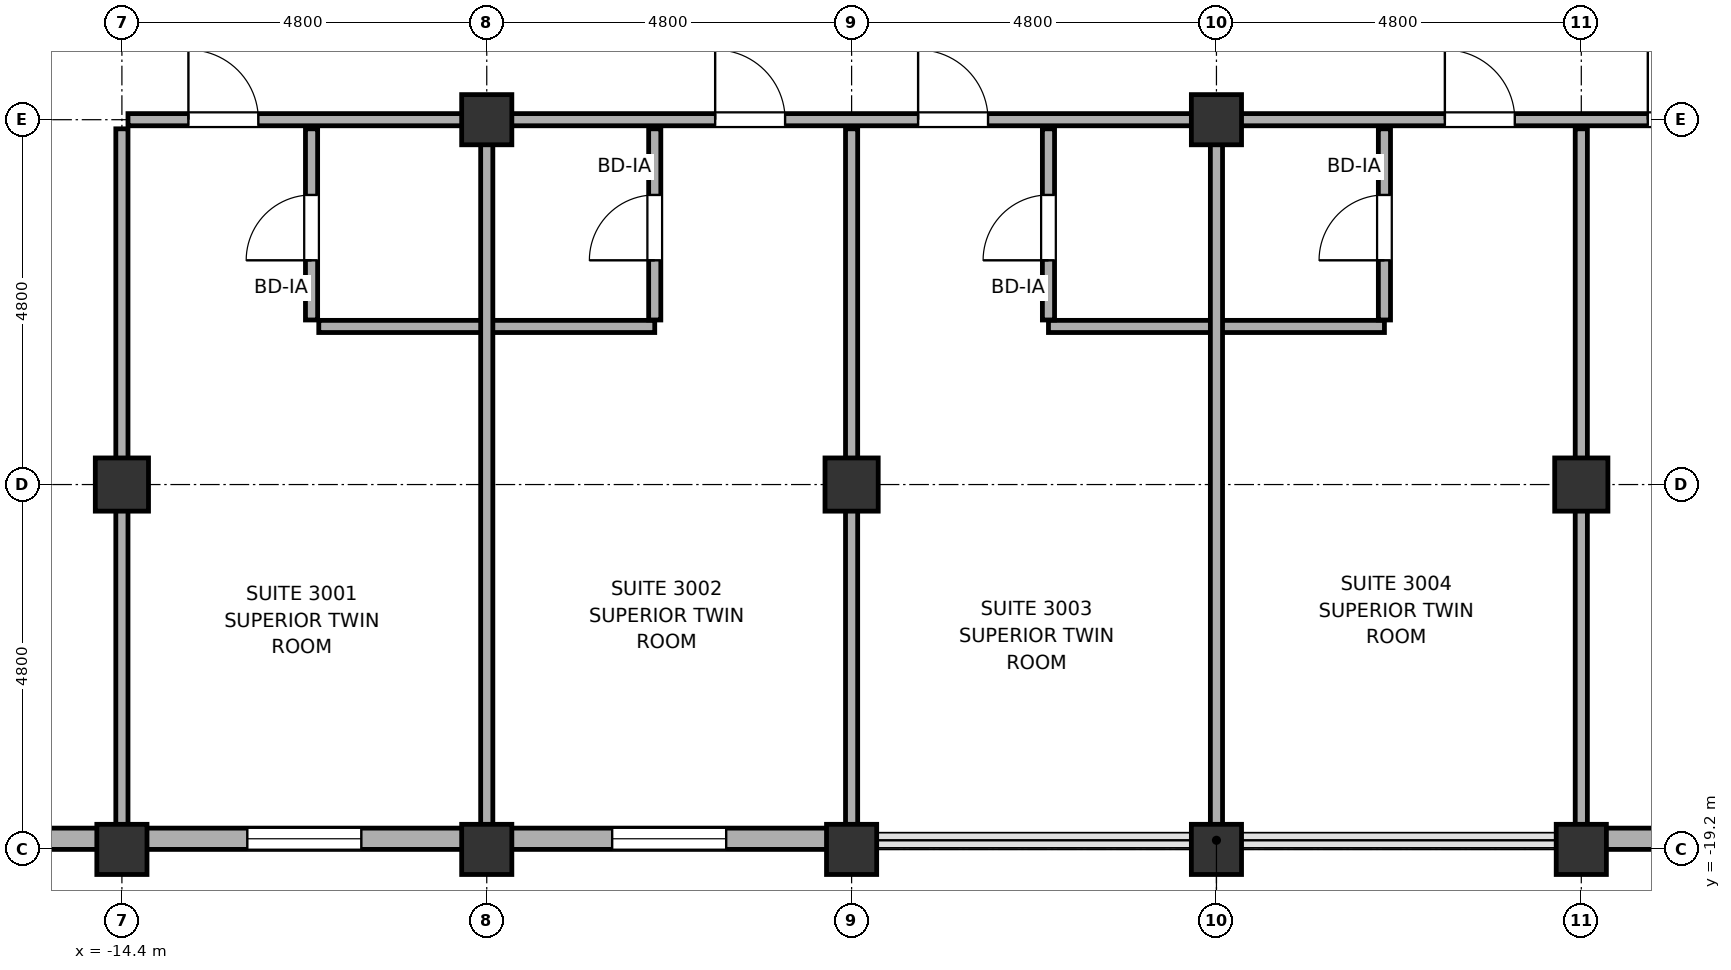
"""IFC4 building model, lengths in metres.
Left out: names, types, materials, properties, quantities, classifications, styles, units other than length and angle.
Written with IfcOpenShell. Run it as: python <this file> out.ifc"""

import sys

from ifc_helpers import new_model, si_unit, direction, frame, frame_2d, origin, origin_2d, place, context, subcontext, project, spatial, rectangle, hollow_rectangle, hollow_circle, extrude, element, fill, save


model = new_model("IFC4")
c1 = context("Model", 3, precision=1e-05, world=origin(), true_north=direction((0.0, 1.0)))
c2 = subcontext(c1, "Body", "Model", "MODEL_VIEW")
j1 = project(units=[si_unit("LENGTHUNIT", "METRE"), si_unit("PLANEANGLEUNIT", "RADIAN")], contexts=[c1])
p1 = place(None, origin())
s1 = spatial("IfcSite", under=j1, at=p1, CompositionType="ELEMENT")
p2 = place(p1, origin())
s2 = spatial("IfcBuilding", under=s1, at=p2, CompositionType="ELEMENT")
p3 = place(p2, frame((0.0, 0.0, 124.8)))
s3 = spatial("IfcBuildingStorey", under=s2, at=p3, CompositionType="ELEMENT", Elevation=124.8)
p4 = place(p3, frame((-14.4, -19.2, 0.0), z_axis=(0.0, 0.0, 1.0), x_axis=(1.0, 0.0, 0.0)))
e1 = element("IfcColumn", 1, at=p4, inside=s3, PredefinedType="COLUMN", context=c2, shape_type="SweptSolid", body=[
    extrude(hollow_circle(Radius=0.33, WallThickness=0.028, at=origin_2d()), origin(), (0.0, 0.0, 1.0), 3.7),
])
p5 = place(p3, frame((-14.4, -14.4, 0.0), z_axis=(0.0, 0.0, 1.0), x_axis=(1.0, 0.0, 0.0)))
e2 = element("IfcColumn", 2, at=p5, inside=s3, PredefinedType="COLUMN", context=c2, shape_type="SweptSolid", body=[
    extrude(hollow_rectangle(XDim=0.7, YDim=0.7, WallThickness=0.032, at=origin_2d()), origin(), (0.0, 0.0, 1.0), 3.7),
])
for number, where, z_axis, x_axis in (
    (3, (-9.6, -19.2, 0.0), (0.0, 0.0, 1.0), (1.0, 0.0, 0.0)),
    (4, (-9.6, -9.6, 0.0), (0.0, 0.0, 1.0), (1.0, 0.0, 0.0)),
    (5, (-4.8, -19.2, 0.0), (0.0, 0.0, 1.0), (1.0, 0.0, 0.0)),
):
    element("IfcColumn", number, at=place(p3, frame(where, z_axis=z_axis, x_axis=x_axis)), inside=s3, PredefinedType="COLUMN", context=c2, shape_type="SweptSolid", body=[
        extrude(hollow_circle(Radius=0.33, WallThickness=0.028, at=origin_2d()), origin(), (0.0, 0.0, 1.0), 3.7),
    ])
p6 = place(p3, frame((-4.8, -14.4, 0.0), z_axis=(0.0, 0.0, 1.0), x_axis=(1.0, 0.0, 0.0)))
e6 = element("IfcColumn", 6, at=p6, inside=s3, PredefinedType="COLUMN", context=c2, shape_type="SweptSolid", body=[
    extrude(hollow_rectangle(XDim=0.7, YDim=0.7, WallThickness=0.032, at=origin_2d()), origin(), (0.0, 0.0, 1.0), 3.7),
])
for number, where, z_axis, x_axis in (
    (7, (0.0, -19.2, 0.0), (0.0, 0.0, 1.0), (1.0, 0.0, 0.0)),
    (8, (0.0, -9.6, 0.0), (0.0, 0.0, 1.0), (1.0, 0.0, 0.0)),
    (9, (4.8, -19.2, 0.0), (0.0, 0.0, 1.0), (1.0, 0.0, 0.0)),
):
    element("IfcColumn", number, at=place(p3, frame(where, z_axis=z_axis, x_axis=x_axis)), inside=s3, PredefinedType="COLUMN", context=c2, shape_type="SweptSolid", body=[
        extrude(hollow_circle(Radius=0.33, WallThickness=0.028, at=origin_2d()), origin(), (0.0, 0.0, 1.0), 3.7),
    ])
p7 = place(p3, frame((4.8, -14.4, 0.0), z_axis=(0.0, 0.0, 1.0), x_axis=(1.0, 0.0, 0.0)))
e10 = element("IfcColumn", 10, at=p7, inside=s3, PredefinedType="COLUMN", context=c2, shape_type="SweptSolid", body=[
    extrude(hollow_rectangle(XDim=0.7, YDim=0.7, WallThickness=0.032, at=origin_2d()), origin(), (0.0, 0.0, 1.0), 3.7),
])
p8 = place(p3, frame((-30.0, -19.06, 0.0), z_axis=(0.0, 0.0, 1.0), x_axis=(1.0, 0.0, 0.0)))
e11 = element("IfcWall", 11, at=p8, inside=s3, PredefinedType="SOLIDWALL", context=c2, shape_type="SweptSolid", body=[
    extrude(rectangle(XDim=25.25, YDim=0.28, at=frame_2d((12.625, 0.0))), origin(), (0.0, 0.0, 1.0), 2.12),
])
p9 = place(p8, frame((7.65, 0.0, 0.75)))
e12 = element("IfcOpeningElement", 12, at=p9, cuts=e11, PredefinedType="OPENING", context=c2, shape_type="SweptSolid", body=[
    extrude(rectangle(XDim=1.5, YDim=1.15, at=frame_2d((0.75, 0.575))), frame((0.0, 0.155, 0.0), z_axis=(0.0, -1.0, 0.0), x_axis=(1.0, 0.0, 0.0)), (0.0, 0.0, 1.0), 0.31),
])
p10 = place(p8, frame((17.25, 0.0, 0.75)))
e13 = element("IfcOpeningElement", 13, at=p10, cuts=e11, PredefinedType="OPENING", context=c2, shape_type="SweptSolid", body=[
    extrude(rectangle(XDim=1.5, YDim=1.15, at=frame_2d((0.75, 0.575))), frame((0.0, 0.155, 0.0), z_axis=(0.0, -1.0, 0.0), x_axis=(1.0, 0.0, 0.0)), (0.0, 0.0, 1.0), 0.31),
])
p11 = place(p8, frame((22.05, 0.0, 0.75)))
e14 = element("IfcOpeningElement", 14, at=p11, cuts=e11, PredefinedType="OPENING", context=c2, shape_type="SweptSolid", body=[
    extrude(rectangle(XDim=1.5, YDim=1.15, at=frame_2d((0.75, 0.575))), frame((0.0, 0.155, 0.0), z_axis=(0.0, -1.0, 0.0), x_axis=(1.0, 0.0, 0.0)), (0.0, 0.0, 1.0), 0.31),
])
p12 = place(p3, frame((4.75, -19.06, 0.0), z_axis=(0.0, 0.0, 1.0), x_axis=(1.0, 0.0, 0.0)))
e15 = element("IfcWall", 15, at=p12, inside=s3, PredefinedType="SOLIDWALL", context=c2, shape_type="SweptSolid", body=[
    extrude(rectangle(XDim=20.45, YDim=0.28, at=frame_2d((10.225, 0.0))), origin(), (0.0, 0.0, 1.0), 2.12),
])
p13 = place(p12, frame((11.817, 0.0, 0.75)))
e16 = element("IfcOpeningElement", 16, at=p13, cuts=e15, PredefinedType="OPENING", context=c2, shape_type="SweptSolid", body=[
    extrude(rectangle(XDim=1.5, YDim=1.15, at=frame_2d((0.75, 0.575))), frame((0.0, 0.155, 0.0), z_axis=(0.0, -1.0, 0.0), x_axis=(1.0, 0.0, 0.0)), (0.0, 0.0, 1.0), 0.31),
])
p14 = place(p12, frame((1.7, 0.0, 0.75)))
e17 = element("IfcOpeningElement", 17, at=p14, cuts=e15, PredefinedType="OPENING", context=c2, shape_type="SweptSolid", body=[
    extrude(rectangle(XDim=1.5, YDim=1.15, at=frame_2d((0.75, 0.575))), frame((0.0, 0.155, 0.0), z_axis=(0.0, -1.0, 0.0), x_axis=(1.0, 0.0, 0.0)), (0.0, 0.0, 1.0), 0.31),
])
p15 = place(p12, frame((6.5, 0.0, 0.75)))
e18 = element("IfcOpeningElement", 18, at=p15, cuts=e15, PredefinedType="OPENING", context=c2, shape_type="SweptSolid", body=[
    extrude(rectangle(XDim=1.5, YDim=1.15, at=frame_2d((0.75, 0.575))), frame((0.0, 0.155, 0.0), z_axis=(0.0, -1.0, 0.0), x_axis=(1.0, 0.0, 0.0)), (0.0, 0.0, 1.0), 0.31),
])
p16 = place(p3, frame((-11.81, -12.32, 0.0), z_axis=(0.0, 0.0, 1.0), x_axis=(1.0, 0.0, 0.0)))
e19 = element("IfcWall", 19, at=p16, inside=s3, PredefinedType="PARTITIONING", context=c2, shape_type="SweptSolid", body=[
    extrude(rectangle(XDim=4.42, YDim=0.16, at=frame_2d((2.21, 0.0))), origin(), (0.0, 0.0, 1.0), 3.12),
])
p17 = place(p3, frame((-2.21, -12.32, 0.0), z_axis=(0.0, 0.0, 1.0), x_axis=(1.0, 0.0, 0.0)))
e20 = element("IfcWall", 20, at=p17, inside=s3, PredefinedType="PARTITIONING", context=c2, shape_type="SweptSolid", body=[
    extrude(rectangle(XDim=4.42, YDim=0.16, at=frame_2d((2.21, 0.0))), origin(), (0.0, 0.0, 1.0), 3.12),
])
p18 = place(p3, frame((-14.32, -9.6, 0.0), z_axis=(0.0, 0.0, 1.0), x_axis=(1.0, 0.0, 0.0)))
e21 = element("IfcWall", 21, at=p18, inside=s3, PredefinedType="PARTITIONING", context=c2, shape_type="SweptSolid", body=[
    extrude(rectangle(XDim=28.64, YDim=0.16, at=frame_2d((14.32, 0.0))), origin(), (0.0, 0.0, 1.0), 2.12),
])
p19 = place(p18, frame((0.795, 0.0, 0.0)))
e22 = element("IfcOpeningElement", 22, at=p19, cuts=e21, PredefinedType="OPENING", context=c2, shape_type="SweptSolid", body=[
    extrude(rectangle(XDim=0.92, YDim=2.02, at=frame_2d((0.46, 1.01))), frame((0.0, 0.095, 0.0), z_axis=(0.0, -1.0, 0.0), x_axis=(1.0, 0.0, 0.0)), (0.0, 0.0, 1.0), 0.19),
])
p20 = place(p18, frame((7.725, 0.0, 0.0)))
e23 = element("IfcOpeningElement", 23, at=p20, cuts=e21, PredefinedType="OPENING", context=c2, shape_type="SweptSolid", body=[
    extrude(rectangle(XDim=0.92, YDim=2.02, at=frame_2d((0.46, 1.01))), frame((0.0, 0.095, 0.0), z_axis=(0.0, -1.0, 0.0), x_axis=(1.0, 0.0, 0.0)), (0.0, 0.0, 1.0), 0.19),
])
p21 = place(p18, frame((10.395, 0.0, 0.0)))
e24 = element("IfcOpeningElement", 24, at=p21, cuts=e21, PredefinedType="OPENING", context=c2, shape_type="SweptSolid", body=[
    extrude(rectangle(XDim=0.92, YDim=2.02, at=frame_2d((0.46, 1.01))), frame((0.0, 0.095, 0.0), z_axis=(0.0, -1.0, 0.0), x_axis=(1.0, 0.0, 0.0)), (0.0, 0.0, 1.0), 0.19),
])
p22 = place(p18, frame((17.325, 0.0, 0.0)))
e25 = element("IfcOpeningElement", 25, at=p22, cuts=e21, PredefinedType="OPENING", context=c2, shape_type="SweptSolid", body=[
    extrude(rectangle(XDim=0.92, YDim=2.02, at=frame_2d((0.46, 1.01))), frame((0.0, 0.095, 0.0), z_axis=(0.0, -1.0, 0.0), x_axis=(1.0, 0.0, 0.0)), (0.0, 0.0, 1.0), 0.19),
])
p23 = place(p18, frame((19.995, 0.0, 0.0)))
e26 = element("IfcOpeningElement", 26, at=p23, cuts=e21, PredefinedType="OPENING", context=c2, shape_type="SweptSolid", body=[
    extrude(rectangle(XDim=0.92, YDim=2.02, at=frame_2d((0.46, 1.01))), frame((0.0, 0.095, 0.0), z_axis=(0.0, -1.0, 0.0), x_axis=(1.0, 0.0, 0.0)), (0.0, 0.0, 1.0), 0.19),
])
p24 = place(p18, frame((26.925, 0.0, 0.0)))
e27 = element("IfcOpeningElement", 27, at=p24, cuts=e21, PredefinedType="OPENING", context=c2, shape_type="SweptSolid", body=[
    extrude(rectangle(XDim=0.92, YDim=2.02, at=frame_2d((0.46, 1.01))), frame((0.0, 0.095, 0.0), z_axis=(0.0, -1.0, 0.0), x_axis=(1.0, 0.0, 0.0)), (0.0, 0.0, 1.0), 0.19),
])
p25 = place(p3, frame((-14.4, -18.91, 0.0), z_axis=(0.0, 0.0, 1.0), x_axis=(0.0, 1.0, 0.0)))
e28 = element("IfcWall", 28, at=p25, inside=s3, PredefinedType="PARTITIONING", context=c2, shape_type="SweptSolid", body=[
    extrude(rectangle(XDim=9.19, YDim=0.16, at=frame_2d((4.595, 0.0))), origin(), (0.0, 0.0, 1.0), 2.12),
])
p26 = place(p3, frame((-11.905, -12.235, 0.0), z_axis=(0.0, 0.0, 1.0), x_axis=(0.0, 1.0, 0.0)))
e29 = element("IfcWall", 29, at=p26, inside=s3, PredefinedType="PARTITIONING", context=c2, shape_type="SweptSolid", body=[
    extrude(rectangle(XDim=2.515, YDim=0.16, at=frame_2d((1.258, 0.0))), origin(), (0.0, 0.0, 1.0), 2.12),
])
p27 = place(p26, frame((0.785, 0.0, 0.0)))
e30 = element("IfcOpeningElement", 30, at=p27, cuts=e29, PredefinedType="OPENING", context=c2, shape_type="SweptSolid", body=[
    extrude(rectangle(XDim=0.86, YDim=2.02, at=frame_2d((0.43, 1.01))), frame((0.0, 0.095, 0.0), z_axis=(0.0, -1.0, 0.0), x_axis=(1.0, 0.0, 0.0)), (0.0, 0.0, 1.0), 0.19),
])
p28 = place(p3, frame((-9.6, -18.91, 0.0), z_axis=(0.0, 0.0, 1.0), x_axis=(0.0, 1.0, 0.0)))
e31 = element("IfcWall", 31, at=p28, inside=s3, PredefinedType="PARTITIONING", context=c2, shape_type="SweptSolid", body=[
    extrude(rectangle(XDim=9.19, YDim=0.16, at=frame_2d((4.595, 0.0))), origin(), (0.0, 0.0, 1.0), 2.12),
])
p29 = place(p3, frame((-7.39, -12.235, 0.0), z_axis=(0.0, 0.0, 1.0), x_axis=(0.0, 1.0, 0.0)))
e32 = element("IfcWall", 32, at=p29, inside=s3, PredefinedType="PARTITIONING", context=c2, shape_type="SweptSolid", body=[
    extrude(rectangle(XDim=2.515, YDim=0.16, at=frame_2d((1.258, 0.0))), origin(), (0.0, 0.0, 1.0), 2.12),
])
p30 = place(p29, frame((0.785, 0.0, 0.0)))
e33 = element("IfcOpeningElement", 33, at=p30, cuts=e32, PredefinedType="OPENING", context=c2, shape_type="SweptSolid", body=[
    extrude(rectangle(XDim=0.86, YDim=2.02, at=frame_2d((0.43, 1.01))), frame((0.0, 0.095, 0.0), z_axis=(0.0, -1.0, 0.0), x_axis=(1.0, 0.0, 0.0)), (0.0, 0.0, 1.0), 0.19),
])
p31 = place(p3, frame((-4.8, -18.91, 0.0), z_axis=(0.0, 0.0, 1.0), x_axis=(0.0, 1.0, 0.0)))
e34 = element("IfcWall", 34, at=p31, inside=s3, PredefinedType="PARTITIONING", context=c2, shape_type="SweptSolid", body=[
    extrude(rectangle(XDim=9.19, YDim=0.16, at=frame_2d((4.595, 0.0))), origin(), (0.0, 0.0, 1.0), 2.12),
])
p32 = place(p3, frame((-2.21, -12.235, 0.0), z_axis=(0.0, 0.0, 1.0), x_axis=(0.0, 1.0, 0.0)))
e35 = element("IfcWall", 35, at=p32, inside=s3, PredefinedType="PARTITIONING", context=c2, shape_type="SweptSolid", body=[
    extrude(rectangle(XDim=2.515, YDim=0.16, at=frame_2d((1.258, 0.0))), origin(), (0.0, 0.0, 1.0), 2.12),
])
p33 = place(p32, frame((0.785, 0.0, 0.0)))
e36 = element("IfcOpeningElement", 36, at=p33, cuts=e35, PredefinedType="OPENING", context=c2, shape_type="SweptSolid", body=[
    extrude(rectangle(XDim=0.86, YDim=2.02, at=frame_2d((0.43, 1.01))), frame((0.0, 0.095, 0.0), z_axis=(0.0, -1.0, 0.0), x_axis=(1.0, 0.0, 0.0)), (0.0, 0.0, 1.0), 0.19),
])
p34 = place(p3, frame((0.0, -18.995, 0.0), z_axis=(0.0, 0.0, 1.0), x_axis=(0.0, 1.0, 0.0)))
e37 = element("IfcWall", 37, at=p34, inside=s3, PredefinedType="PARTITIONING", context=c2, shape_type="SweptSolid", body=[
    extrude(rectangle(XDim=9.275, YDim=0.16, at=frame_2d((4.638, 0.0))), origin(), (0.0, 0.0, 1.0), 2.12),
])
p35 = place(p3, frame((2.21, -12.235, 0.0), z_axis=(0.0, 0.0, 1.0), x_axis=(0.0, 1.0, 0.0)))
e38 = element("IfcWall", 38, at=p35, inside=s3, PredefinedType="PARTITIONING", context=c2, shape_type="SweptSolid", body=[
    extrude(rectangle(XDim=2.515, YDim=0.16, at=frame_2d((1.258, 0.0))), origin(), (0.0, 0.0, 1.0), 2.12),
])
p36 = place(p35, frame((0.785, 0.0, 0.0)))
e39 = element("IfcOpeningElement", 39, at=p36, cuts=e38, PredefinedType="OPENING", context=c2, shape_type="SweptSolid", body=[
    extrude(rectangle(XDim=0.86, YDim=2.02, at=frame_2d((0.43, 1.01))), frame((0.0, 0.095, 0.0), z_axis=(0.0, -1.0, 0.0), x_axis=(1.0, 0.0, 0.0)), (0.0, 0.0, 1.0), 0.19),
])
p37 = place(p3, frame((4.8, -18.91, 0.0), z_axis=(0.0, 0.0, 1.0), x_axis=(0.0, 1.0, 0.0)))
e40 = element("IfcWall", 40, at=p37, inside=s3, PredefinedType="PARTITIONING", context=c2, shape_type="SweptSolid", body=[
    extrude(rectangle(XDim=9.19, YDim=0.16, at=frame_2d((4.595, 0.0))), origin(), (0.0, 0.0, 1.0), 2.12),
])
p38 = place(p10, origin())
e41 = element("IfcWindow", 41, at=p38, inside=s3, PartitioningType="SINGLE_PANEL", PredefinedType="WINDOW", context=c2, shape_type="SweptSolid", body=[
    extrude(rectangle(XDim=1.5, YDim=1.15, at=frame_2d((0.75, 0.575))), frame((0.0, 0.03, 0.0), z_axis=(0.0, -1.0, 0.0), x_axis=(1.0, 0.0, 0.0)), (0.0, 0.0, 1.0), 0.06),
])
fill(e13, e41)
p39 = place(p11, origin())
e42 = element("IfcWindow", 42, at=p39, inside=s3, PartitioningType="SINGLE_PANEL", PredefinedType="WINDOW", context=c2, shape_type="SweptSolid", body=[
    extrude(rectangle(XDim=1.5, YDim=1.15, at=frame_2d((0.75, 0.575))), frame((0.0, 0.03, 0.0), z_axis=(0.0, -1.0, 0.0), x_axis=(1.0, 0.0, 0.0)), (0.0, 0.0, 1.0), 0.06),
])
fill(e14, e42)
p40 = place(p19, origin())
e43 = element("IfcDoor", 43, at=p40, inside=s3, OperationType="SINGLE_SWING_LEFT", PredefinedType="DOOR", context=c2, shape_type="SweptSolid", body=[
    extrude(rectangle(XDim=0.92, YDim=2.02, at=frame_2d((0.46, 1.01))), frame((0.0, 0.025, 0.0), z_axis=(0.0, -1.0, 0.0), x_axis=(1.0, 0.0, 0.0)), (0.0, 0.0, 1.0), 0.05),
])
fill(e22, e43)
p41 = place(p27, origin())
e44 = element("IfcDoor", 44, at=p41, inside=s3, OperationType="SINGLE_SWING_LEFT", PredefinedType="DOOR", context=c2, shape_type="SweptSolid", body=[
    extrude(rectangle(XDim=0.86, YDim=2.02, at=frame_2d((0.43, 1.01))), frame((0.0, 0.025, 0.0), z_axis=(0.0, -1.0, 0.0), x_axis=(1.0, 0.0, 0.0)), (0.0, 0.0, 1.0), 0.05),
])
fill(e30, e44)
p42 = place(p20, origin())
e45 = element("IfcDoor", 45, at=p42, inside=s3, OperationType="SINGLE_SWING_LEFT", PredefinedType="DOOR", context=c2, shape_type="SweptSolid", body=[
    extrude(rectangle(XDim=0.92, YDim=2.02, at=frame_2d((0.46, 1.01))), frame((0.0, 0.025, 0.0), z_axis=(0.0, -1.0, 0.0), x_axis=(1.0, 0.0, 0.0)), (0.0, 0.0, 1.0), 0.05),
])
fill(e23, e45)
p43 = place(p30, origin())
e46 = element("IfcDoor", 46, at=p43, inside=s3, OperationType="SINGLE_SWING_RIGHT", PredefinedType="DOOR", context=c2, shape_type="SweptSolid", body=[
    extrude(rectangle(XDim=0.86, YDim=2.02, at=frame_2d((0.43, 1.01))), frame((0.0, 0.025, 0.0), z_axis=(0.0, -1.0, 0.0), x_axis=(1.0, 0.0, 0.0)), (0.0, 0.0, 1.0), 0.05),
])
fill(e33, e46)
p44 = place(p21, origin())
e47 = element("IfcDoor", 47, at=p44, inside=s3, OperationType="SINGLE_SWING_RIGHT", PredefinedType="DOOR", context=c2, shape_type="SweptSolid", body=[
    extrude(rectangle(XDim=0.92, YDim=2.02, at=frame_2d((0.46, 1.01))), frame((0.0, 0.025, 0.0), z_axis=(0.0, -1.0, 0.0), x_axis=(1.0, 0.0, 0.0)), (0.0, 0.0, 1.0), 0.05),
])
fill(e24, e47)
p45 = place(p33, origin())
e48 = element("IfcDoor", 48, at=p45, inside=s3, OperationType="SINGLE_SWING_LEFT", PredefinedType="DOOR", context=c2, shape_type="SweptSolid", body=[
    extrude(rectangle(XDim=0.86, YDim=2.02, at=frame_2d((0.43, 1.01))), frame((0.0, 0.025, 0.0), z_axis=(0.0, -1.0, 0.0), x_axis=(1.0, 0.0, 0.0)), (0.0, 0.0, 1.0), 0.05),
])
fill(e36, e48)
p46 = place(p22, origin())
e49 = element("IfcDoor", 49, at=p46, inside=s3, OperationType="SINGLE_SWING_RIGHT", PredefinedType="DOOR", context=c2, shape_type="SweptSolid", body=[
    extrude(rectangle(XDim=0.92, YDim=2.02, at=frame_2d((0.46, 1.01))), frame((0.0, 0.025, 0.0), z_axis=(0.0, -1.0, 0.0), x_axis=(1.0, 0.0, 0.0)), (0.0, 0.0, 1.0), 0.05),
])
fill(e25, e49)
p47 = place(p36, origin())
e50 = element("IfcDoor", 50, at=p47, inside=s3, OperationType="SINGLE_SWING_LEFT", PredefinedType="DOOR", context=c2, shape_type="SweptSolid", body=[
    extrude(rectangle(XDim=0.86, YDim=2.02, at=frame_2d((0.43, 1.01))), frame((0.0, 0.025, 0.0), z_axis=(0.0, -1.0, 0.0), x_axis=(1.0, 0.0, 0.0)), (0.0, 0.0, 1.0), 0.05),
])
fill(e39, e50)
p48 = place(p23, origin())
e51 = element("IfcDoor", 51, at=p48, inside=s3, OperationType="SINGLE_SWING_RIGHT", PredefinedType="DOOR", context=c2, shape_type="SweptSolid", body=[
    extrude(rectangle(XDim=0.92, YDim=2.02, at=frame_2d((0.46, 1.01))), frame((0.0, 0.025, 0.0), z_axis=(0.0, -1.0, 0.0), x_axis=(1.0, 0.0, 0.0)), (0.0, 0.0, 1.0), 0.05),
])
fill(e26, e51)
save(model, sys.argv[1])
